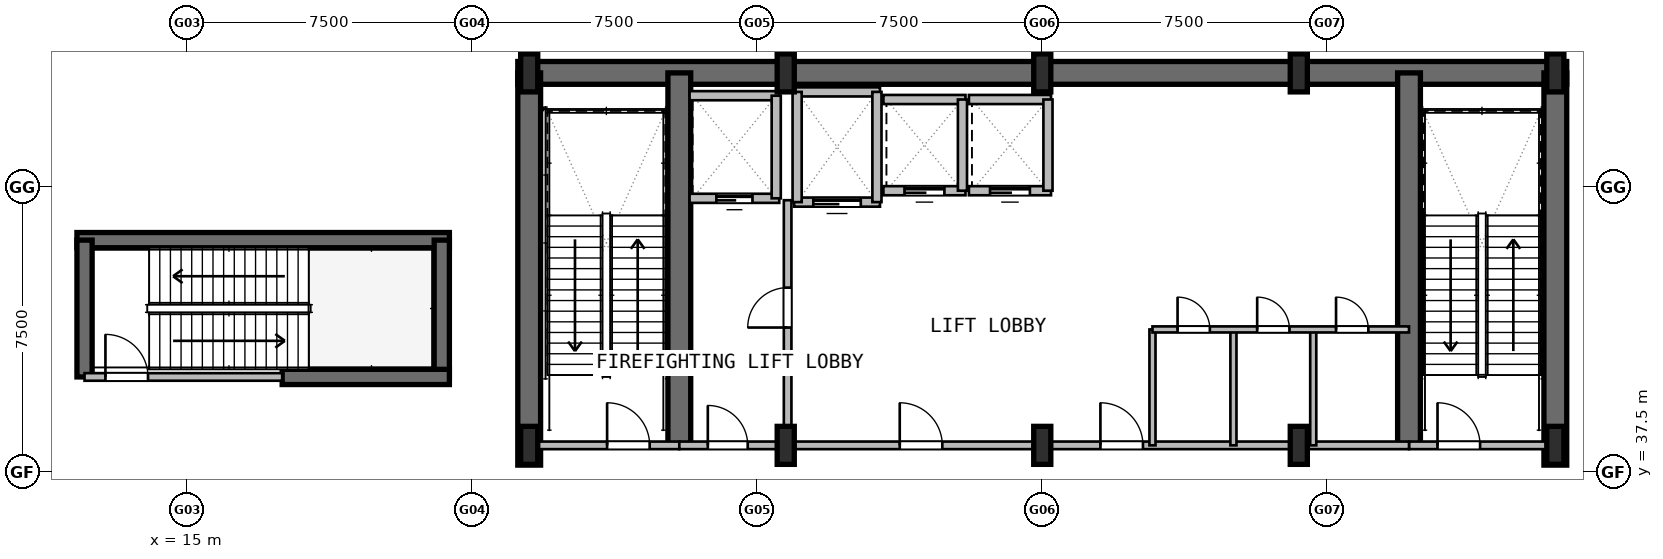
"""IFC4 building model, lengths in metres.
Left out: names, types, materials, properties, quantities, classifications, styles, units other than length and angle.
Written with IfcOpenShell. Run it as: python <this file> out.ifc"""

import sys

from ifc_helpers import new_model, si_unit, direction, frame, frame_2d, origin, origin_2d, place, context, subcontext, project, spatial, rectangle, i_section, extrude, element, fill, save


model = new_model("IFC4")
c1 = context("Model", 3, precision=1e-05, world=origin(), true_north=direction((0.0, 1.0)))
c2 = subcontext(c1, "Body", "Model", "MODEL_VIEW")
j1 = project(units=[si_unit("LENGTHUNIT", "METRE"), si_unit("PLANEANGLEUNIT", "RADIAN")], contexts=[c1])
p1 = place(None, origin())
s1 = spatial("IfcSite", under=j1, at=p1, CompositionType="ELEMENT")
p2 = place(p1, origin())
s2 = spatial("IfcBuilding", under=s1, at=p2, CompositionType="ELEMENT")
p3 = place(p2, frame((0.0, 0.0, -5.4)))
s3 = spatial("IfcBuildingStorey", under=s2, at=p3, CompositionType="ELEMENT", Elevation=-5.4)
p4 = place(p3, frame((23.7, 48.0, 0.0), z_axis=(0.0, 0.0, 1.0), x_axis=(1.0, 0.0, 0.0)))
e1 = element("IfcWall", 1, at=p4, inside=s3, PredefinedType="SHEAR", context=c2, shape_type="SweptSolid", body=[
    extrude(rectangle(XDim=27.6, YDim=0.6, at=frame_2d((13.8, 0.0))), origin(), (0.0, 0.0, 1.0), 5.4),
])
for number, where, z_axis, x_axis in (
    (2, (24.0, 37.68, 0.0), (0.0, 0.0, 1.0), (0.0, 1.0, 0.0)),
    (3, (51.0, 37.68, 0.0), (0.0, 0.0, 1.0), (0.0, 1.0, 0.0)),
):
    element("IfcWall", number, at=place(p3, frame(where, z_axis=z_axis, x_axis=x_axis)), inside=s3, PredefinedType="SHEAR", context=c2, shape_type="SweptSolid", body=[
        extrude(rectangle(XDim=10.32, YDim=0.6, at=frame_2d((5.16, 0.0))), origin(), (0.0, 0.0, 1.0), 5.4),
    ])
for number, where, z_axis, x_axis in (
    (4, (27.95, 38.2, 0.0), (0.0, 0.0, 1.0), (0.0, 1.0, 0.0)),
    (5, (47.15, 38.2, 0.0), (0.0, 0.0, 1.0), (0.0, 1.0, 0.0)),
):
    element("IfcWall", number, at=place(p3, frame(where, z_axis=z_axis, x_axis=x_axis)), inside=s3, PredefinedType="SHEAR", context=c2, shape_type="SweptSolid", body=[
        extrude(rectangle(XDim=9.8, YDim=0.6, at=frame_2d((4.9, 0.0))), origin(), (0.0, 0.0, 1.0), 5.4),
    ])
for number, where, z_axis, x_axis in (
    (6, (24.0, 38.2, 0.0), (0.0, 0.0, 1.0), (1.0, 0.0, 0.0)),
    (7, (24.0, 48.0, 0.0), (0.0, 0.0, 1.0), (1.0, 0.0, 0.0)),
    (8, (30.75, 38.2, 0.0), (0.0, 0.0, 1.0), (1.0, 0.0, 0.0)),
    (9, (30.75, 48.0, 0.0), (0.0, 0.0, 1.0), (1.0, 0.0, 0.0)),
    (10, (37.5, 38.2, 0.0), (0.0, 0.0, 1.0), (1.0, 0.0, 0.0)),
    (11, (37.5, 48.0, 0.0), (0.0, 0.0, 1.0), (1.0, 0.0, 0.0)),
    (12, (44.25, 38.2, 0.0), (0.0, 0.0, 1.0), (1.0, 0.0, 0.0)),
    (13, (44.25, 48.0, 0.0), (0.0, 0.0, 1.0), (1.0, 0.0, 0.0)),
    (14, (51.0, 38.2, 0.0), (0.0, 0.0, 1.0), (1.0, 0.0, 0.0)),
    (15, (51.0, 48.0, 0.0), (0.0, 0.0, 1.0), (1.0, 0.0, 0.0)),
):
    element("IfcColumn", number, at=place(p3, frame(where, z_axis=z_axis, x_axis=x_axis)), inside=s3, PredefinedType="COLUMN", context=c2, shape_type="SweptSolid", body=[
        extrude(i_section(OverallWidth=0.45, OverallDepth=1.0, WebThickness=0.022, FlangeThickness=0.04, at=origin_2d()), origin(), (0.0, 0.0, 1.0), 5.4),
    ])
p5 = place(p3, frame((12.1, 43.6, 0.0), z_axis=(0.0, 0.0, 1.0), x_axis=(1.0, 0.0, 0.0)))
e16 = element("IfcWall", 16, at=p5, inside=s3, PredefinedType="SHEAR", context=c2, shape_type="SweptSolid", body=[
    extrude(rectangle(XDim=9.8, YDim=0.4, at=frame_2d((4.9, 0.0))), origin(), (0.0, 0.0, 1.0), 5.4),
])
for number, where, z_axis, x_axis in (
    (17, (12.3, 40.0, 0.0), (0.0, 0.0, 1.0), (0.0, 1.0, 0.0)),
    (18, (21.7, 40.0, 0.0), (0.0, 0.0, 1.0), (0.0, 1.0, 0.0)),
):
    element("IfcWall", number, at=place(p3, frame(where, z_axis=z_axis, x_axis=x_axis)), inside=s3, PredefinedType="SHEAR", context=c2, shape_type="SweptSolid", body=[
        extrude(rectangle(XDim=3.6, YDim=0.4, at=frame_2d((1.8, 0.0))), origin(), (0.0, 0.0, 1.0), 5.4),
    ])
p6 = place(p3, frame((17.5, 40.0, 0.0), z_axis=(0.0, 0.0, 1.0), x_axis=(1.0, 0.0, 0.0)))
e19 = element("IfcWall", 19, at=p6, inside=s3, PredefinedType="SHEAR", context=c2, shape_type="SweptSolid", body=[
    extrude(rectangle(XDim=4.4, YDim=0.4, at=frame_2d((2.2, 0.0))), origin(), (0.0, 0.0, 1.0), 5.4),
])
p7 = place(p3, frame((24.0, 38.2, 0.0), z_axis=(0.0, 0.0, 1.0), x_axis=(1.0, 0.0, 0.0)))
e20 = element("IfcWall", 20, at=p7, inside=s3, PredefinedType="PARTITIONING", context=c2, shape_type="SweptSolid", body=[
    extrude(rectangle(XDim=3.95, YDim=0.2, at=frame_2d((1.975, 0.0))), origin(), (0.0, 0.0, 1.0), 4.28),
])
p8 = place(p7, frame((2.05, 0.0, 0.0)))
e21 = element("IfcOpeningElement", 21, at=p8, cuts=e20, PredefinedType="OPENING", context=c2, shape_type="SweptSolid", body=[
    extrude(rectangle(XDim=1.12, YDim=2.1, at=frame_2d((0.56, 1.05))), frame((0.0, 0.11, 0.0), z_axis=(0.0, -1.0, 0.0), x_axis=(1.0, 0.0, 0.0)), (0.0, 0.0, 1.0), 0.22),
])
p9 = place(p3, frame((47.15, 38.2, 0.0), z_axis=(0.0, 0.0, 1.0), x_axis=(1.0, 0.0, 0.0)))
e22 = element("IfcWall", 22, at=p9, inside=s3, PredefinedType="PARTITIONING", context=c2, shape_type="SweptSolid", body=[
    extrude(rectangle(XDim=3.85, YDim=0.2, at=frame_2d((1.925, 0.0))), origin(), (0.0, 0.0, 1.0), 4.28),
])
p10 = place(p9, frame((0.75, 0.0, 0.0)))
e23 = element("IfcOpeningElement", 23, at=p10, cuts=e22, PredefinedType="OPENING", context=c2, shape_type="SweptSolid", body=[
    extrude(rectangle(XDim=1.12, YDim=2.1, at=frame_2d((0.56, 1.05))), frame((0.0, 0.11, 0.0), z_axis=(0.0, -1.0, 0.0), x_axis=(1.0, 0.0, 0.0)), (0.0, 0.0, 1.0), 0.22),
])
p11 = place(p3, frame((30.8, 38.2, 0.0), z_axis=(0.0, 0.0, 1.0), x_axis=(0.0, 1.0, 0.0)))
e24 = element("IfcWall", 24, at=p11, inside=s3, PredefinedType="PARTITIONING", context=c2, shape_type="SweptSolid", body=[
    extrude(rectangle(XDim=6.45, YDim=0.2, at=frame_2d((3.225, 0.0))), origin(), (0.0, 0.0, 1.0), 4.28),
])
p12 = place(p11, frame((3.1, 0.0, 0.0)))
e25 = element("IfcOpeningElement", 25, at=p12, cuts=e24, PredefinedType="OPENING", context=c2, shape_type="SweptSolid", body=[
    extrude(rectangle(XDim=1.05, YDim=2.1, at=frame_2d((0.525, 1.05))), frame((0.0, 0.11, 0.0), z_axis=(0.0, -1.0, 0.0), x_axis=(1.0, 0.0, 0.0)), (0.0, 0.0, 1.0), 0.22),
])
p13 = place(p3, frame((27.95, 38.2, 0.0), z_axis=(0.0, 0.0, 1.0), x_axis=(1.0, 0.0, 0.0)))
e26 = element("IfcWall", 26, at=p13, inside=s3, PredefinedType="PARTITIONING", context=c2, shape_type="SweptSolid", body=[
    extrude(rectangle(XDim=2.85, YDim=0.2, at=frame_2d((1.425, 0.0))), origin(), (0.0, 0.0, 1.0), 4.28),
])
p14 = place(p13, frame((0.75, 0.0, 0.0)))
e27 = element("IfcOpeningElement", 27, at=p14, cuts=e26, PredefinedType="OPENING", context=c2, shape_type="SweptSolid", body=[
    extrude(rectangle(XDim=1.05, YDim=2.1, at=frame_2d((0.525, 1.05))), frame((0.0, 0.11, 0.0), z_axis=(0.0, -1.0, 0.0), x_axis=(1.0, 0.0, 0.0)), (0.0, 0.0, 1.0), 0.22),
])
p15 = place(p3, frame((30.8, 38.2, 0.0), z_axis=(0.0, 0.0, 1.0), x_axis=(1.0, 0.0, 0.0)))
e28 = element("IfcWall", 28, at=p15, inside=s3, PredefinedType="PARTITIONING", context=c2, shape_type="SweptSolid", body=[
    extrude(rectangle(XDim=16.35, YDim=0.2, at=frame_2d((8.175, 0.0))), origin(), (0.0, 0.0, 1.0), 4.28),
])
p16 = place(p15, frame((2.95, 0.0, 0.0)))
e29 = element("IfcOpeningElement", 29, at=p16, cuts=e28, PredefinedType="OPENING", context=c2, shape_type="SweptSolid", body=[
    extrude(rectangle(XDim=1.12, YDim=2.1, at=frame_2d((0.56, 1.05))), frame((0.0, 0.11, 0.0), z_axis=(0.0, -1.0, 0.0), x_axis=(1.0, 0.0, 0.0)), (0.0, 0.0, 1.0), 0.22),
])
p17 = place(p15, frame((8.23, 0.0, 0.0)))
e30 = element("IfcOpeningElement", 30, at=p17, cuts=e28, PredefinedType="OPENING", context=c2, shape_type="SweptSolid", body=[
    extrude(rectangle(XDim=1.12, YDim=2.1, at=frame_2d((0.56, 1.05))), frame((0.0, 0.11, 0.0), z_axis=(0.0, -1.0, 0.0), x_axis=(1.0, 0.0, 0.0)), (0.0, 0.0, 1.0), 0.22),
])
p18 = place(p3, frame((28.22, 44.7, 0.0), z_axis=(0.0, 0.0, 1.0), x_axis=(1.0, 0.0, 0.0)))
e31 = element("IfcWall", 31, at=p18, inside=s3, PredefinedType="PARTITIONING", context=c2, shape_type="SweptSolid", body=[
    extrude(rectangle(XDim=2.36, YDim=0.24, at=frame_2d((1.18, 0.0))), origin(), (0.0, 0.0, 1.0), 5.08),
])
p19 = place(p18, frame((0.705, 0.0, 0.0)))
e32 = element("IfcOpeningElement", 32, at=p19, cuts=e31, PredefinedType="OPENING", context=c2, shape_type="SweptSolid", body=[
    extrude(rectangle(XDim=0.95, YDim=2.15, at=frame_2d((0.475, 1.075))), frame((0.0, 0.13, 0.0), z_axis=(0.0, -1.0, 0.0), x_axis=(1.0, 0.0, 0.0)), (0.0, 0.0, 1.0), 0.26),
])
p20 = place(p3, frame((28.22, 47.4, 0.0), z_axis=(0.0, 0.0, 1.0), x_axis=(1.0, 0.0, 0.0)))
e33 = element("IfcWall", 33, at=p20, inside=s3, PredefinedType="PARTITIONING", context=c2, shape_type="SweptSolid", body=[
    extrude(rectangle(XDim=2.36, YDim=0.24, at=frame_2d((1.18, 0.0))), origin(), (0.0, 0.0, 1.0), 5.08),
])
p21 = place(p3, frame((30.5, 44.7, 0.0), z_axis=(0.0, 0.0, 1.0), x_axis=(0.0, 1.0, 0.0)))
e34 = element("IfcWall", 34, at=p21, inside=s3, PredefinedType="PARTITIONING", context=c2, shape_type="SweptSolid", body=[
    extrude(rectangle(XDim=2.7, YDim=0.24, at=frame_2d((1.35, 0.0))), origin(), (0.0, 0.0, 1.0), 4.28),
])
p22 = place(p3, frame((30.97, 44.6, 0.0), z_axis=(0.0, 0.0, 1.0), x_axis=(1.0, 0.0, 0.0)))
e35 = element("IfcWall", 35, at=p22, inside=s3, PredefinedType="PARTITIONING", context=c2, shape_type="SweptSolid", body=[
    extrude(rectangle(XDim=2.26, YDim=0.24, at=frame_2d((1.13, 0.0))), origin(), (0.0, 0.0, 1.0), 5.08),
])
p23 = place(p22, frame((0.505, 0.0, 0.0)))
e36 = element("IfcOpeningElement", 36, at=p23, cuts=e35, PredefinedType="OPENING", context=c2, shape_type="SweptSolid", body=[
    extrude(rectangle(XDim=1.25, YDim=2.2, at=frame_2d((0.625, 1.1))), frame((0.0, 0.13, 0.0), z_axis=(0.0, -1.0, 0.0), x_axis=(1.0, 0.0, 0.0)), (0.0, 0.0, 1.0), 0.26),
])
p24 = place(p3, frame((30.97, 47.5, 0.0), z_axis=(0.0, 0.0, 1.0), x_axis=(1.0, 0.0, 0.0)))
e37 = element("IfcWall", 37, at=p24, inside=s3, PredefinedType="PARTITIONING", context=c2, shape_type="SweptSolid", body=[
    extrude(rectangle(XDim=2.26, YDim=0.24, at=frame_2d((1.13, 0.0))), origin(), (0.0, 0.0, 1.0), 5.08),
])
p25 = place(p3, frame((31.05, 44.6, 0.0), z_axis=(0.0, 0.0, 1.0), x_axis=(0.0, 1.0, 0.0)))
e38 = element("IfcWall", 38, at=p25, inside=s3, PredefinedType="PARTITIONING", context=c2, shape_type="SweptSolid", body=[
    extrude(rectangle(XDim=2.9, YDim=0.24, at=frame_2d((1.45, 0.0))), origin(), (0.0, 0.0, 1.0), 4.28),
])
p26 = place(p3, frame((33.15, 44.6, 0.0), z_axis=(0.0, 0.0, 1.0), x_axis=(0.0, 1.0, 0.0)))
e39 = element("IfcWall", 39, at=p26, inside=s3, PredefinedType="PARTITIONING", context=c2, shape_type="SweptSolid", body=[
    extrude(rectangle(XDim=2.9, YDim=0.24, at=frame_2d((1.45, 0.0))), origin(), (0.0, 0.0, 1.0), 5.08),
])
p27 = place(p3, frame((33.32, 44.9, 0.0), z_axis=(0.0, 0.0, 1.0), x_axis=(1.0, 0.0, 0.0)))
e40 = element("IfcWall", 40, at=p27, inside=s3, PredefinedType="PARTITIONING", context=c2, shape_type="SweptSolid", body=[
    extrude(rectangle(XDim=2.16, YDim=0.24, at=frame_2d((1.08, 0.0))), origin(), (0.0, 0.0, 1.0), 5.08),
])
p28 = place(p27, frame((0.555, 0.0, 0.0)))
e41 = element("IfcOpeningElement", 41, at=p28, cuts=e40, PredefinedType="OPENING", context=c2, shape_type="SweptSolid", body=[
    extrude(rectangle(XDim=1.05, YDim=2.15, at=frame_2d((0.525, 1.075))), frame((0.0, 0.13, 0.0), z_axis=(0.0, -1.0, 0.0), x_axis=(1.0, 0.0, 0.0)), (0.0, 0.0, 1.0), 0.26),
])
p29 = place(p3, frame((33.32, 47.3, 0.0), z_axis=(0.0, 0.0, 1.0), x_axis=(1.0, 0.0, 0.0)))
e42 = element("IfcWall", 42, at=p29, inside=s3, PredefinedType="PARTITIONING", context=c2, shape_type="SweptSolid", body=[
    extrude(rectangle(XDim=2.16, YDim=0.24, at=frame_2d((1.08, 0.0))), origin(), (0.0, 0.0, 1.0), 5.08),
])
p30 = place(p3, frame((35.4, 44.9, 0.0), z_axis=(0.0, 0.0, 1.0), x_axis=(0.0, 1.0, 0.0)))
e43 = element("IfcWall", 43, at=p30, inside=s3, PredefinedType="PARTITIONING", context=c2, shape_type="SweptSolid", body=[
    extrude(rectangle(XDim=2.4, YDim=0.24, at=frame_2d((1.2, 0.0))), origin(), (0.0, 0.0, 1.0), 5.08),
])
p31 = place(p3, frame((35.57, 44.9, 0.0), z_axis=(0.0, 0.0, 1.0), x_axis=(1.0, 0.0, 0.0)))
e44 = element("IfcWall", 44, at=p31, inside=s3, PredefinedType="PARTITIONING", context=c2, shape_type="SweptSolid", body=[
    extrude(rectangle(XDim=2.16, YDim=0.24, at=frame_2d((1.08, 0.0))), origin(), (0.0, 0.0, 1.0), 5.08),
])
p32 = place(p31, frame((0.555, 0.0, 0.0)))
e45 = element("IfcOpeningElement", 45, at=p32, cuts=e44, PredefinedType="OPENING", context=c2, shape_type="SweptSolid", body=[
    extrude(rectangle(XDim=1.05, YDim=2.15, at=frame_2d((0.525, 1.075))), frame((0.0, 0.13, 0.0), z_axis=(0.0, -1.0, 0.0), x_axis=(1.0, 0.0, 0.0)), (0.0, 0.0, 1.0), 0.26),
])
p33 = place(p3, frame((35.57, 47.3, 0.0), z_axis=(0.0, 0.0, 1.0), x_axis=(1.0, 0.0, 0.0)))
e46 = element("IfcWall", 46, at=p33, inside=s3, PredefinedType="PARTITIONING", context=c2, shape_type="SweptSolid", body=[
    extrude(rectangle(XDim=2.16, YDim=0.24, at=frame_2d((1.08, 0.0))), origin(), (0.0, 0.0, 1.0), 5.08),
])
p34 = place(p3, frame((37.65, 44.9, 0.0), z_axis=(0.0, 0.0, 1.0), x_axis=(0.0, 1.0, 0.0)))
e47 = element("IfcWall", 47, at=p34, inside=s3, PredefinedType="PARTITIONING", context=c2, shape_type="SweptSolid", body=[
    extrude(rectangle(XDim=2.4, YDim=0.24, at=frame_2d((1.2, 0.0))), origin(), (0.0, 0.0, 1.0), 5.08),
])
p35 = place(p3, frame((12.3, 40.0, 0.0), z_axis=(0.0, 0.0, 1.0), x_axis=(1.0, 0.0, 0.0)))
e48 = element("IfcWall", 48, at=p35, inside=s3, PredefinedType="PARTITIONING", context=c2, shape_type="SweptSolid", body=[
    extrude(rectangle(XDim=5.2, YDim=0.2, at=frame_2d((2.6, 0.0))), origin(), (0.0, 0.0, 1.0), 5.08),
])
p36 = place(p35, frame((0.55, 0.0, 0.0)))
e49 = element("IfcOpeningElement", 49, at=p36, cuts=e48, PredefinedType="OPENING", context=c2, shape_type="SweptSolid", body=[
    extrude(rectangle(XDim=1.12, YDim=2.1, at=frame_2d((0.56, 1.05))), frame((0.0, 0.11, 0.0), z_axis=(0.0, -1.0, 0.0), x_axis=(1.0, 0.0, 0.0)), (0.0, 0.0, 1.0), 0.22),
])
for number, where, z_axis, x_axis in (
    (50, (40.4, 38.2, 0.0), (0.0, 0.0, 1.0), (0.0, 1.0, 0.0)),
    (51, (42.53, 38.2, 0.0), (0.0, 0.0, 1.0), (0.0, 1.0, 0.0)),
    (52, (44.63, 38.2, 0.0), (0.0, 0.0, 1.0), (0.0, 1.0, 0.0)),
):
    element("IfcWall", number, at=place(p3, frame(where, z_axis=z_axis, x_axis=x_axis)), inside=s3, PredefinedType="PARTITIONING", context=c2, shape_type="SweptSolid", body=[
        extrude(rectangle(XDim=3.05, YDim=0.16, at=frame_2d((1.525, 0.0))), origin(), (0.0, 0.0, 1.0), 5.08),
    ])
p37 = place(p3, frame((40.4, 41.25, 0.0), z_axis=(0.0, 0.0, 1.0), x_axis=(1.0, 0.0, 0.0)))
e53 = element("IfcWall", 53, at=p37, inside=s3, PredefinedType="PARTITIONING", context=c2, shape_type="SweptSolid", body=[
    extrude(rectangle(XDim=6.75, YDim=0.16, at=frame_2d((3.375, 0.0))), origin(), (0.0, 0.0, 1.0), 5.08),
])
p38 = place(p37, frame((0.66, 0.0, 0.0)))
e54 = element("IfcOpeningElement", 54, at=p38, cuts=e53, PredefinedType="OPENING", context=c2, shape_type="SweptSolid", body=[
    extrude(rectangle(XDim=0.85, YDim=2.05, at=frame_2d((0.425, 1.025))), frame((0.0, 0.09, 0.0), z_axis=(0.0, -1.0, 0.0), x_axis=(1.0, 0.0, 0.0)), (0.0, 0.0, 1.0), 0.18),
])
p39 = place(p37, frame((2.755, 0.0, 0.0)))
e55 = element("IfcOpeningElement", 55, at=p39, cuts=e53, PredefinedType="OPENING", context=c2, shape_type="SweptSolid", body=[
    extrude(rectangle(XDim=0.85, YDim=2.05, at=frame_2d((0.425, 1.025))), frame((0.0, 0.09, 0.0), z_axis=(0.0, -1.0, 0.0), x_axis=(1.0, 0.0, 0.0)), (0.0, 0.0, 1.0), 0.18),
])
p40 = place(p37, frame((4.83, 0.0, 0.0)))
e56 = element("IfcOpeningElement", 56, at=p40, cuts=e53, PredefinedType="OPENING", context=c2, shape_type="SweptSolid", body=[
    extrude(rectangle(XDim=0.85, YDim=2.05, at=frame_2d((0.425, 1.025))), frame((0.0, 0.09, 0.0), z_axis=(0.0, -1.0, 0.0), x_axis=(1.0, 0.0, 0.0)), (0.0, 0.0, 1.0), 0.18),
])
p41 = place(p8, origin())
e57 = element("IfcDoor", 57, at=p41, inside=s3, OperationType="SINGLE_SWING_RIGHT", PredefinedType="DOOR", context=c2, shape_type="SweptSolid", body=[
    extrude(rectangle(XDim=1.12, YDim=2.1, at=frame_2d((0.56, 1.05))), frame((0.0, 0.025, 0.0), z_axis=(0.0, -1.0, 0.0), x_axis=(1.0, 0.0, 0.0)), (0.0, 0.0, 1.0), 0.05),
])
fill(e21, e57)
p42 = place(p10, origin())
e58 = element("IfcDoor", 58, at=p42, inside=s3, OperationType="SINGLE_SWING_LEFT", PredefinedType="DOOR", context=c2, shape_type="SweptSolid", body=[
    extrude(rectangle(XDim=1.12, YDim=2.1, at=frame_2d((0.56, 1.05))), frame((0.0, 0.025, 0.0), z_axis=(0.0, -1.0, 0.0), x_axis=(1.0, 0.0, 0.0)), (0.0, 0.0, 1.0), 0.05),
])
fill(e23, e58)
p43 = place(p12, origin())
e59 = element("IfcDoor", 59, at=p43, inside=s3, OperationType="SINGLE_SWING_RIGHT", PredefinedType="DOOR", context=c2, shape_type="SweptSolid", body=[
    extrude(rectangle(XDim=1.05, YDim=2.1, at=frame_2d((0.525, 1.05))), frame((0.0, 0.025, 0.0), z_axis=(0.0, -1.0, 0.0), x_axis=(1.0, 0.0, 0.0)), (0.0, 0.0, 1.0), 0.05),
])
fill(e25, e59)
p44 = place(p14, origin())
e60 = element("IfcDoor", 60, at=p44, inside=s3, OperationType="SINGLE_SWING_LEFT", PredefinedType="DOOR", context=c2, shape_type="SweptSolid", body=[
    extrude(rectangle(XDim=1.05, YDim=2.1, at=frame_2d((0.525, 1.05))), frame((0.0, 0.025, 0.0), z_axis=(0.0, -1.0, 0.0), x_axis=(1.0, 0.0, 0.0)), (0.0, 0.0, 1.0), 0.05),
])
fill(e27, e60)
p45 = place(p16, origin())
e61 = element("IfcDoor", 61, at=p45, inside=s3, OperationType="SINGLE_SWING_RIGHT", PredefinedType="DOOR", context=c2, shape_type="SweptSolid", body=[
    extrude(rectangle(XDim=1.12, YDim=2.1, at=frame_2d((0.56, 1.05))), frame((0.0, 0.025, 0.0), z_axis=(0.0, -1.0, 0.0), x_axis=(1.0, 0.0, 0.0)), (0.0, 0.0, 1.0), 0.05),
])
fill(e29, e61)
p46 = place(p17, origin())
e62 = element("IfcDoor", 62, at=p46, inside=s3, OperationType="SINGLE_SWING_LEFT", PredefinedType="DOOR", context=c2, shape_type="SweptSolid", body=[
    extrude(rectangle(XDim=1.12, YDim=2.1, at=frame_2d((0.56, 1.05))), frame((0.0, 0.025, 0.0), z_axis=(0.0, -1.0, 0.0), x_axis=(1.0, 0.0, 0.0)), (0.0, 0.0, 1.0), 0.05),
])
fill(e30, e62)
p47 = place(p19, origin())
e63 = element("IfcDoor", 63, at=p47, inside=s3, OperationType="SLIDING_TO_LEFT", PredefinedType="DOOR", context=c2, shape_type="SweptSolid", body=[
    extrude(rectangle(XDim=0.95, YDim=2.15, at=frame_2d((0.475, 1.075))), frame((0.0, 0.025, 0.0), z_axis=(0.0, -1.0, 0.0), x_axis=(1.0, 0.0, 0.0)), (0.0, 0.0, 1.0), 0.05),
])
fill(e32, e63)
p48 = place(p23, origin())
e64 = element("IfcDoor", 64, at=p48, inside=s3, OperationType="SLIDING_TO_LEFT", PredefinedType="DOOR", context=c2, shape_type="SweptSolid", body=[
    extrude(rectangle(XDim=1.25, YDim=2.2, at=frame_2d((0.625, 1.1))), frame((0.0, 0.025, 0.0), z_axis=(0.0, -1.0, 0.0), x_axis=(1.0, 0.0, 0.0)), (0.0, 0.0, 1.0), 0.05),
])
fill(e36, e64)
p49 = place(p28, origin())
e65 = element("IfcDoor", 65, at=p49, inside=s3, OperationType="SLIDING_TO_LEFT", PredefinedType="DOOR", context=c2, shape_type="SweptSolid", body=[
    extrude(rectangle(XDim=1.05, YDim=2.15, at=frame_2d((0.525, 1.075))), frame((0.0, 0.025, 0.0), z_axis=(0.0, -1.0, 0.0), x_axis=(1.0, 0.0, 0.0)), (0.0, 0.0, 1.0), 0.05),
])
fill(e41, e65)
p50 = place(p32, origin())
e66 = element("IfcDoor", 66, at=p50, inside=s3, OperationType="SLIDING_TO_LEFT", PredefinedType="DOOR", context=c2, shape_type="SweptSolid", body=[
    extrude(rectangle(XDim=1.05, YDim=2.15, at=frame_2d((0.525, 1.075))), frame((0.0, 0.025, 0.0), z_axis=(0.0, -1.0, 0.0), x_axis=(1.0, 0.0, 0.0)), (0.0, 0.0, 1.0), 0.05),
])
fill(e45, e66)
p51 = place(p36, origin())
e67 = element("IfcDoor", 67, at=p51, inside=s3, OperationType="SINGLE_SWING_LEFT", PredefinedType="DOOR", context=c2, shape_type="SweptSolid", body=[
    extrude(rectangle(XDim=1.12, YDim=2.1, at=frame_2d((0.56, 1.05))), frame((0.0, 0.025, 0.0), z_axis=(0.0, -1.0, 0.0), x_axis=(1.0, 0.0, 0.0)), (0.0, 0.0, 1.0), 0.05),
])
fill(e49, e67)
p52 = place(p38, origin())
e68 = element("IfcDoor", 68, at=p52, inside=s3, OperationType="SINGLE_SWING_RIGHT", PredefinedType="DOOR", context=c2, shape_type="SweptSolid", body=[
    extrude(rectangle(XDim=0.85, YDim=2.05, at=frame_2d((0.425, 1.025))), frame((0.0, 0.025, 0.0), z_axis=(0.0, -1.0, 0.0), x_axis=(1.0, 0.0, 0.0)), (0.0, 0.0, 1.0), 0.05),
])
fill(e54, e68)
p53 = place(p39, origin())
e69 = element("IfcDoor", 69, at=p53, inside=s3, OperationType="SINGLE_SWING_LEFT", PredefinedType="DOOR", context=c2, shape_type="SweptSolid", body=[
    extrude(rectangle(XDim=0.85, YDim=2.05, at=frame_2d((0.425, 1.025))), frame((0.0, 0.025, 0.0), z_axis=(0.0, -1.0, 0.0), x_axis=(1.0, 0.0, 0.0)), (0.0, 0.0, 1.0), 0.05),
])
fill(e55, e69)
p54 = place(p40, origin())
e70 = element("IfcDoor", 70, at=p54, inside=s3, OperationType="SINGLE_SWING_RIGHT", PredefinedType="DOOR", context=c2, shape_type="SweptSolid", body=[
    extrude(rectangle(XDim=0.85, YDim=2.05, at=frame_2d((0.425, 1.025))), frame((0.0, 0.025, 0.0), z_axis=(0.0, -1.0, 0.0), x_axis=(1.0, 0.0, 0.0)), (0.0, 0.0, 1.0), 0.05),
])
fill(e56, e70)
save(model, sys.argv[1])
